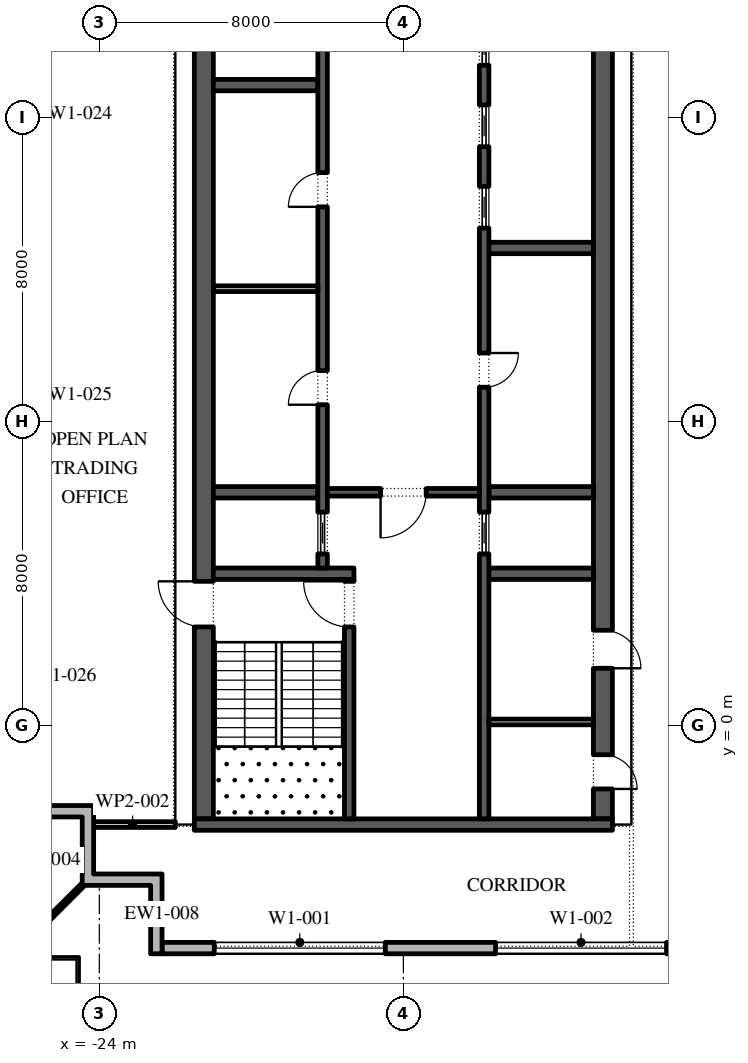
"""IFC4 building model, lengths in metres.
Left out: names, types, materials, properties, quantities, classifications, styles, units other than length and angle.
Written with IfcOpenShell. Run it as: python <this file> out.ifc"""

import sys

from ifc_helpers import new_model, si_unit, direction, frame, frame_2d, origin, place, context, subcontext, project, spatial, polyline, rectangle, outline, extrude, element, fill, save


model = new_model("IFC4")
c1 = context("Model", 3, precision=1e-05, world=origin(), true_north=direction((0.0, 1.0)))
c2 = subcontext(c1, "Body", "Model", "MODEL_VIEW")
j1 = project(units=[si_unit("LENGTHUNIT", "METRE"), si_unit("PLANEANGLEUNIT", "RADIAN")], contexts=[c1])
p1 = place(None, origin())
s1 = spatial("IfcSite", under=j1, at=p1, CompositionType="ELEMENT")
p2 = place(p1, origin())
s2 = spatial("IfcBuilding", under=s1, at=p2, CompositionType="ELEMENT")
p3 = place(p2, frame((0.0, 0.0, 309.0)))
s3 = spatial("IfcBuildingStorey", under=s2, at=p3, CompositionType="ELEMENT", Elevation=309.0)
p4 = place(p3, frame((-22.35, -5.85, 0.0), z_axis=(0.0, 0.0, 1.0), x_axis=(1.0, 0.0, 0.0)))
e1 = element("IfcWall", 1, at=p4, inside=s3, PredefinedType="STANDARD", context=c2, shape_type="SweptSolid", body=[
    extrude(rectangle(XDim=45.0, YDim=0.3, at=frame_2d((22.5, 0.0))), origin(), (0.0, 0.0, 1.0), 4.0),
])
p5 = place(p4, frame((1.375, 0.0, 0.45)))
e2 = element("IfcOpeningElement", 2, at=p5, cuts=e1, PredefinedType="OPENING", context=c2, shape_type="SweptSolid", body=[
    extrude(rectangle(XDim=4.5, YDim=3.05, at=frame_2d((2.25, 1.525))), frame((0.0, 0.16, 0.0), z_axis=(0.0, -1.0, 0.0), x_axis=(1.0, 0.0, 0.0)), (0.0, 0.0, 1.0), 0.32),
])
p6 = place(p4, frame((8.775, 0.0, 0.45)))
e3 = element("IfcOpeningElement", 3, at=p6, cuts=e1, PredefinedType="OPENING", context=c2, shape_type="SweptSolid", body=[
    extrude(rectangle(XDim=4.5, YDim=3.05, at=frame_2d((2.25, 1.525))), frame((0.0, 0.16, 0.0), z_axis=(0.0, -1.0, 0.0), x_axis=(1.0, 0.0, 0.0)), (0.0, 0.0, 1.0), 0.32),
])
p7 = place(p4, frame((17.375, 0.0, 0.0)))
e4 = element("IfcOpeningElement", 4, at=p7, cuts=e1, PredefinedType="OPENING", context=c2, shape_type="SweptSolid", body=[
    extrude(rectangle(XDim=2.4, YDim=3.5, at=frame_2d((1.2, 1.75))), frame((0.0, 0.16, 0.0), z_axis=(0.0, -1.0, 0.0), x_axis=(1.0, 0.0, 0.0)), (0.0, 0.0, 1.0), 0.32),
])
p8 = place(p4, frame((23.875, 0.0, 0.45)))
e5 = element("IfcOpeningElement", 5, at=p8, cuts=e1, PredefinedType="OPENING", context=c2, shape_type="SweptSolid", body=[
    extrude(rectangle(XDim=4.5, YDim=3.05, at=frame_2d((2.25, 1.525))), frame((0.0, 0.16, 0.0), z_axis=(0.0, -1.0, 0.0), x_axis=(1.0, 0.0, 0.0)), (0.0, 0.0, 1.0), 0.32),
])
p9 = place(p4, frame((31.425, 0.0, 0.45)))
e6 = element("IfcOpeningElement", 6, at=p9, cuts=e1, PredefinedType="OPENING", context=c2, shape_type="SweptSolid", body=[
    extrude(rectangle(XDim=4.5, YDim=3.05, at=frame_2d((2.25, 1.525))), frame((0.0, 0.16, 0.0), z_axis=(0.0, -1.0, 0.0), x_axis=(1.0, 0.0, 0.0)), (0.0, 0.0, 1.0), 0.32),
])
p10 = place(p4, frame((38.975, 0.0, 0.45)))
e7 = element("IfcOpeningElement", 7, at=p10, cuts=e1, PredefinedType="OPENING", context=c2, shape_type="SweptSolid", body=[
    extrude(rectangle(XDim=4.5, YDim=3.05, at=frame_2d((2.25, 1.525))), frame((0.0, 0.16, 0.0), z_axis=(0.0, -1.0, 0.0), x_axis=(1.0, 0.0, 0.0)), (0.0, 0.0, 1.0), 0.32),
])
p11 = place(p3, origin())
e8 = element("IfcWall", 8, at=p11, inside=s3, PredefinedType="STANDARD", context=c2, shape_type="SweptSolid", body=[
    extrude(outline(polyline([(-22.65, -4.2), (-24.45, -4.2), (-24.45, -2.4), (-25.95, -2.4), (-25.95, -2.1), (-24.15, -2.1), (-24.15, -3.9), (-22.35, -3.9), (-22.35, -6.0), (-22.65, -6.0), (-22.65, -4.2)])), origin(), (0.0, 0.0, 1.0), 4.0),
])
p12 = place(p3, frame((-24.45, -4.2, -0.05), z_axis=(0.0, 0.0, 1.0), x_axis=(-0.707106781187, -0.707106781187, 0.0)))
e9 = element("IfcWall", 9, at=p12, inside=s3, PredefinedType="STANDARD", context=c2, shape_type="SweptSolid", body=[
    extrude(rectangle(XDim=2.667, YDim=0.1, at=frame_2d((1.333, 0.0))), origin(), (0.0, 0.0, 1.0), 4.05),
])
p13 = place(p3, frame((-21.25, -2.45, 0.0), z_axis=(0.0, 0.0, 1.0), x_axis=(0.0, 1.0, 0.0)))
e10 = element("IfcWall", 10, at=p13, inside=s3, PredefinedType="SHEAR", context=c2, shape_type="SweptSolid", body=[
    extrude(rectangle(XDim=27.9, YDim=0.5, at=frame_2d((13.95, 0.0))), origin(), (0.0, 0.0, 1.0), 4.0),
])
p14 = place(p13, frame((5.05, 0.0, 0.0)))
e11 = element("IfcOpeningElement", 11, at=p14, cuts=e10, PredefinedType="OPENING", context=c2, shape_type="SweptSolid", body=[
    extrude(rectangle(XDim=1.2, YDim=2.1, at=frame_2d((0.6, 1.05))), frame((0.0, 0.26, 0.0), z_axis=(0.0, -1.0, 0.0), x_axis=(1.0, 0.0, 0.0)), (0.0, 0.0, 1.0), 0.52),
])
p15 = place(p13, frame((21.65, 0.0, 0.0)))
e12 = element("IfcOpeningElement", 12, at=p15, cuts=e10, PredefinedType="OPENING", context=c2, shape_type="SweptSolid", body=[
    extrude(rectangle(XDim=1.2, YDim=2.1, at=frame_2d((0.6, 1.05))), frame((0.0, 0.26, 0.0), z_axis=(0.0, -1.0, 0.0), x_axis=(1.0, 0.0, 0.0)), (0.0, 0.0, 1.0), 0.52),
])
p16 = place(p3, frame((-10.75, -2.45, 0.0), z_axis=(0.0, 0.0, 1.0), x_axis=(0.0, 1.0, 0.0)))
e13 = element("IfcWall", 13, at=p16, inside=s3, PredefinedType="SHEAR", context=c2, shape_type="SweptSolid", body=[
    extrude(rectangle(XDim=27.9, YDim=0.5, at=frame_2d((13.95, 0.0))), origin(), (0.0, 0.0, 1.0), 4.0),
])
p17 = place(p16, frame((23.65, 0.0, 0.0)))
e14 = element("IfcOpeningElement", 14, at=p17, cuts=e13, PredefinedType="OPENING", context=c2, shape_type="SweptSolid", body=[
    extrude(rectangle(XDim=2.4, YDim=2.1, at=frame_2d((1.2, 1.05))), frame((0.0, 0.26, 0.0), z_axis=(0.0, -1.0, 0.0), x_axis=(1.0, 0.0, 0.0)), (0.0, 0.0, 1.0), 0.52),
])
p18 = place(p16, frame((0.788, 0.0, 0.0)))
e15 = element("IfcOpeningElement", 15, at=p18, cuts=e13, PredefinedType="OPENING", context=c2, shape_type="SweptSolid", body=[
    extrude(rectangle(XDim=0.9, YDim=2.1, at=frame_2d((0.45, 1.05))), frame((0.0, 0.26, 0.0), z_axis=(0.0, -1.0, 0.0), x_axis=(1.0, 0.0, 0.0)), (0.0, 0.0, 1.0), 0.52),
])
p19 = place(p16, frame((3.962, 0.0, 0.0)))
e16 = element("IfcOpeningElement", 16, at=p19, cuts=e13, PredefinedType="OPENING", context=c2, shape_type="SweptSolid", body=[
    extrude(rectangle(XDim=1.0, YDim=2.1, at=frame_2d((0.5, 1.05))), frame((0.0, 0.26, 0.0), z_axis=(0.0, -1.0, 0.0), x_axis=(1.0, 0.0, 0.0)), (0.0, 0.0, 1.0), 0.52),
])
p20 = place(p3, frame((-21.5, -2.6, 0.0), z_axis=(0.0, 0.0, 1.0), x_axis=(1.0, 0.0, 0.0)))
e17 = element("IfcWall", 17, at=p20, inside=s3, PredefinedType="SHEAR", context=c2, shape_type="SweptSolid", body=[
    extrude(rectangle(XDim=11.0, YDim=0.3, at=frame_2d((5.5, 0.0))), origin(), (0.0, 0.0, 1.0), 4.0),
])
p21 = place(p3, frame((-21.0, 4.0, 0.0), z_axis=(0.0, 0.0, 1.0), x_axis=(1.0, 0.0, 0.0)))
e18 = element("IfcWall", 18, at=p21, inside=s3, PredefinedType="SHEAR", context=c2, shape_type="SweptSolid", body=[
    extrude(rectangle(XDim=3.7, YDim=0.3, at=frame_2d((1.85, 0.0))), origin(), (0.0, 0.0, 1.0), 4.0),
])
p22 = place(p3, frame((-17.425, -2.45, 0.0), z_axis=(0.0, 0.0, 1.0), x_axis=(0.0, 1.0, 0.0)))
e19 = element("IfcWall", 19, at=p22, inside=s3, PredefinedType="SHEAR", context=c2, shape_type="SweptSolid", body=[
    extrude(rectangle(XDim=6.3, YDim=0.25, at=frame_2d((3.15, 0.0))), origin(), (0.0, 0.0, 1.0), 4.0),
])
p23 = place(p22, frame((5.05, 0.0, 0.0)))
e20 = element("IfcOpeningElement", 20, at=p23, cuts=e19, PredefinedType="OPENING", context=c2, shape_type="SweptSolid", body=[
    extrude(rectangle(XDim=1.2, YDim=2.1, at=frame_2d((0.6, 1.05))), frame((0.0, 0.135, 0.0), z_axis=(0.0, -1.0, 0.0), x_axis=(1.0, 0.0, 0.0)), (0.0, 0.0, 1.0), 0.27),
])
for number, where, z_axis, x_axis in (
    (21, (-21.0, 6.143, 0.0), (0.0, 0.0, 1.0), (1.0, 0.0, 0.0)),
    (22, (-21.0, 16.857, 0.0), (0.0, 0.0, 1.0), (1.0, 0.0, 0.0)),
):
    element("IfcWall", number, at=place(p3, frame(where, z_axis=z_axis, x_axis=x_axis)), inside=s3, PredefinedType="SHEAR", context=c2, shape_type="SweptSolid", body=[
        extrude(rectangle(XDim=2.75, YDim=0.3, at=frame_2d((1.375, 0.0))), origin(), (0.0, 0.0, 1.0), 4.0),
    ])
p24 = place(p3, frame((-18.125, 4.15, 0.0), z_axis=(0.0, 0.0, 1.0), x_axis=(0.0, 1.0, 0.0)))
e23 = element("IfcWall", 23, at=p24, inside=s3, PredefinedType="SHEAR", context=c2, shape_type="SweptSolid", body=[
    extrude(rectangle(XDim=14.7, YDim=0.25, at=frame_2d((7.35, 0.0))), origin(), (0.0, 0.0, 1.0), 4.0),
])
p25 = place(p24, frame((4.296, 0.0, 0.0)))
e24 = element("IfcOpeningElement", 24, at=p25, cuts=e23, PredefinedType="OPENING", context=c2, shape_type="SweptSolid", body=[
    extrude(rectangle(XDim=0.9, YDim=2.1, at=frame_2d((0.45, 1.05))), frame((0.0, 0.135, 0.0), z_axis=(0.0, -1.0, 0.0), x_axis=(1.0, 0.0, 0.0)), (0.0, 0.0, 1.0), 0.27),
])
p26 = place(p24, frame((9.504, 0.0, 0.0)))
e25 = element("IfcOpeningElement", 25, at=p26, cuts=e23, PredefinedType="OPENING", context=c2, shape_type="SweptSolid", body=[
    extrude(rectangle(XDim=0.9, YDim=2.1, at=frame_2d((0.45, 1.05))), frame((0.0, 0.135, 0.0), z_axis=(0.0, -1.0, 0.0), x_axis=(1.0, 0.0, 0.0)), (0.0, 0.0, 1.0), 0.27),
])
p27 = place(p24, frame((0.371, 0.0, 0.0)))
e26 = element("IfcOpeningElement", 26, at=p27, cuts=e23, PredefinedType="OPENING", context=c2, shape_type="SweptSolid", body=[
    extrude(rectangle(XDim=1.1, YDim=2.1, at=frame_2d((0.55, 1.05))), frame((0.0, 0.135, 0.0), z_axis=(0.0, -1.0, 0.0), x_axis=(1.0, 0.0, 0.0)), (0.0, 0.0, 1.0), 0.27),
])
p28 = place(p3, frame((-21.0, 11.5, 0.0), z_axis=(0.0, 0.0, 1.0), x_axis=(1.0, 0.0, 0.0)))
e27 = element("IfcWall", 27, at=p28, inside=s3, PredefinedType="PARTITIONING", context=c2, shape_type="SweptSolid", body=[
    extrude(rectangle(XDim=2.75, YDim=0.15, at=frame_2d((1.375, 0.0))), origin(), (0.0, 0.0, 1.0), 4.0),
])
p29 = place(p3, frame((-14.0, 4.0, 0.0), z_axis=(0.0, 0.0, 1.0), x_axis=(1.0, 0.0, 0.0)))
e28 = element("IfcWall", 28, at=p29, inside=s3, PredefinedType="SHEAR", context=c2, shape_type="SweptSolid", body=[
    extrude(rectangle(XDim=3.0, YDim=0.3, at=frame_2d((1.5, 0.0))), origin(), (0.0, 0.0, 1.0), 4.0),
])
for number, where, z_axis, x_axis in (
    (29, (-13.75, 6.143, 0.0), (0.0, 0.0, 1.0), (1.0, 0.0, 0.0)),
    (30, (-13.75, 12.571, 0.0), (0.0, 0.0, 1.0), (1.0, 0.0, 0.0)),
):
    element("IfcWall", number, at=place(p3, frame(where, z_axis=z_axis, x_axis=x_axis)), inside=s3, PredefinedType="SHEAR", context=c2, shape_type="SweptSolid", body=[
        extrude(rectangle(XDim=2.75, YDim=0.3, at=frame_2d((1.375, 0.0))), origin(), (0.0, 0.0, 1.0), 4.0),
    ])
p30 = place(p3, frame((-13.875, -2.45, 0.0), z_axis=(0.0, 0.0, 1.0), x_axis=(0.0, 1.0, 0.0)))
e31 = element("IfcWall", 31, at=p30, inside=s3, PredefinedType="SHEAR", context=c2, shape_type="SweptSolid", body=[
    extrude(rectangle(XDim=21.3, YDim=0.25, at=frame_2d((10.65, 0.0))), origin(), (0.0, 0.0, 1.0), 4.0),
])
p31 = place(p30, frame((11.357, 0.0, 0.0)))
e32 = element("IfcOpeningElement", 32, at=p31, cuts=e31, PredefinedType="OPENING", context=c2, shape_type="SweptSolid", body=[
    extrude(rectangle(XDim=0.9, YDim=2.1, at=frame_2d((0.45, 1.05))), frame((0.0, 0.135, 0.0), z_axis=(0.0, -1.0, 0.0), x_axis=(1.0, 0.0, 0.0)), (0.0, 0.0, 1.0), 0.27),
])
p32 = place(p30, frame((6.971, 0.0, 0.0)))
e33 = element("IfcOpeningElement", 33, at=p32, cuts=e31, PredefinedType="OPENING", context=c2, shape_type="SweptSolid", body=[
    extrude(rectangle(XDim=1.1, YDim=2.1, at=frame_2d((0.55, 1.05))), frame((0.0, 0.135, 0.0), z_axis=(0.0, -1.0, 0.0), x_axis=(1.0, 0.0, 0.0)), (0.0, 0.0, 1.0), 0.27),
])
p33 = place(p30, frame((15.543, 0.0, 0.0)))
e34 = element("IfcOpeningElement", 34, at=p33, cuts=e31, PredefinedType="OPENING", context=c2, shape_type="SweptSolid", body=[
    extrude(rectangle(XDim=1.1, YDim=2.1, at=frame_2d((0.55, 1.05))), frame((0.0, 0.135, 0.0), z_axis=(0.0, -1.0, 0.0), x_axis=(1.0, 0.0, 0.0)), (0.0, 0.0, 1.0), 0.27),
])
p34 = place(p30, frame((17.686, 0.0, 0.0)))
e35 = element("IfcOpeningElement", 35, at=p34, cuts=e31, PredefinedType="OPENING", context=c2, shape_type="SweptSolid", body=[
    extrude(rectangle(XDim=1.1, YDim=2.1, at=frame_2d((0.55, 1.05))), frame((0.0, 0.135, 0.0), z_axis=(0.0, -1.0, 0.0), x_axis=(1.0, 0.0, 0.0)), (0.0, 0.0, 1.0), 0.27),
])
p35 = place(p30, frame((19.829, 0.0, 0.0)))
e36 = element("IfcOpeningElement", 36, at=p35, cuts=e31, PredefinedType="OPENING", context=c2, shape_type="SweptSolid", body=[
    extrude(rectangle(XDim=1.1, YDim=2.1, at=frame_2d((0.55, 1.05))), frame((0.0, 0.135, 0.0), z_axis=(0.0, -1.0, 0.0), x_axis=(1.0, 0.0, 0.0)), (0.0, 0.0, 1.0), 0.27),
])
p36 = place(p3, frame((-18.0, 6.143, 0.0), z_axis=(0.0, 0.0, 1.0), x_axis=(1.0, 0.0, 0.0)))
e37 = element("IfcWall", 37, at=p36, inside=s3, PredefinedType="SHEAR", context=c2, shape_type="SweptSolid", body=[
    extrude(rectangle(XDim=4.0, YDim=0.2, at=frame_2d((2.0, 0.0))), origin(), (0.0, 0.0, 1.0), 4.0),
])
p37 = place(p36, frame((1.4, 0.0, 0.0)))
e38 = element("IfcOpeningElement", 38, at=p37, cuts=e37, PredefinedType="OPENING", context=c2, shape_type="SweptSolid", body=[
    extrude(rectangle(XDim=1.2, YDim=2.1, at=frame_2d((0.6, 1.05))), frame((0.0, 0.11, 0.0), z_axis=(0.0, -1.0, 0.0), x_axis=(1.0, 0.0, 0.0)), (0.0, 0.0, 1.0), 0.22),
])
p38 = place(p3, frame((-13.75, 0.1, 0.0), z_axis=(0.0, 0.0, 1.0), x_axis=(1.0, 0.0, 0.0)))
e39 = element("IfcWall", 39, at=p38, inside=s3, PredefinedType="PARTITIONING", context=c2, shape_type="SweptSolid", body=[
    extrude(rectangle(XDim=2.75, YDim=0.15, at=frame_2d((1.375, 0.0))), origin(), (0.0, 0.0, 1.0), 4.0),
])
p39 = place(p3, frame((-24.25, -2.6, 0.0), z_axis=(0.0, 0.0, 1.0), x_axis=(1.0, 0.0, 0.0)))
e40 = element("IfcWall", 40, at=p39, inside=s3, PredefinedType="PARTITIONING", context=c2, shape_type="SweptSolid", body=[
    extrude(rectangle(XDim=2.25, YDim=0.15, at=frame_2d((1.125, 0.0))), origin(), (0.0, 0.0, 1.0), 4.0),
])
p40 = place(p5, origin())
e41 = element("IfcWindow", 41, at=p40, inside=s3, PartitioningType="DOUBLE_PANEL_VERTICAL", PredefinedType="WINDOW", context=c2, shape_type="SweptSolid", body=[
    extrude(rectangle(XDim=4.5, YDim=3.05, at=frame_2d((2.25, 1.525))), frame((0.0, 0.03, 0.0), z_axis=(0.0, -1.0, 0.0), x_axis=(1.0, 0.0, 0.0)), (0.0, 0.0, 1.0), 0.06),
])
fill(e2, e41)
p41 = place(p6, origin())
e42 = element("IfcWindow", 42, at=p41, inside=s3, PartitioningType="DOUBLE_PANEL_VERTICAL", PredefinedType="WINDOW", context=c2, shape_type="SweptSolid", body=[
    extrude(rectangle(XDim=4.5, YDim=3.05, at=frame_2d((2.25, 1.525))), frame((0.0, 0.03, 0.0), z_axis=(0.0, -1.0, 0.0), x_axis=(1.0, 0.0, 0.0)), (0.0, 0.0, 1.0), 0.06),
])
fill(e3, e42)
p42 = place(p25, origin())
e43 = element("IfcDoor", 43, at=p42, inside=s3, OperationType="SINGLE_SWING_RIGHT", PredefinedType="DOOR", context=c2, shape_type="SweptSolid", body=[
    extrude(rectangle(XDim=0.9, YDim=2.1, at=frame_2d((0.45, 1.05))), frame((0.0, 0.125, 0.0), z_axis=(0.0, -1.0, 0.0), x_axis=(1.0, 0.0, 0.0)), (0.0, 0.0, 1.0), 0.05),
])
fill(e24, e43)
p43 = place(p26, origin())
e44 = element("IfcDoor", 44, at=p43, inside=s3, OperationType="SINGLE_SWING_RIGHT", PredefinedType="DOOR", context=c2, shape_type="SweptSolid", body=[
    extrude(rectangle(XDim=0.9, YDim=2.1, at=frame_2d((0.45, 1.05))), frame((0.0, 0.125, 0.0), z_axis=(0.0, -1.0, 0.0), x_axis=(1.0, 0.0, 0.0)), (0.0, 0.0, 1.0), 0.05),
])
fill(e25, e44)
p44 = place(p27, origin())
e45 = element("IfcDoor", 45, at=p44, inside=s3, OperationType="SLIDING_TO_LEFT", PredefinedType="DOOR", context=c2, shape_type="SweptSolid", body=[
    extrude(rectangle(XDim=1.1, YDim=2.1, at=frame_2d((0.55, 1.05))), frame((0.0, 0.025, 0.0), z_axis=(0.0, -1.0, 0.0), x_axis=(1.0, 0.0, 0.0)), (0.0, 0.0, 1.0), 0.05),
])
fill(e26, e45)
p45 = place(p31, frame((0.9, -0.2, 0.0), z_axis=(0.0, 0.0, 1.0), x_axis=(-1.0, 0.0, 0.0)))
e46 = element("IfcDoor", 46, at=p45, inside=s3, OperationType="SINGLE_SWING_RIGHT", PredefinedType="DOOR", context=c2, shape_type="SweptSolid", body=[
    extrude(rectangle(XDim=0.9, YDim=2.1, at=frame_2d((0.45, 1.05))), frame((0.0, -0.075, 0.0), z_axis=(0.0, -1.0, 0.0), x_axis=(1.0, 0.0, 0.0)), (0.0, 0.0, 1.0), 0.05),
])
fill(e32, e46)
p46 = place(p32, origin())
e47 = element("IfcDoor", 47, at=p46, inside=s3, OperationType="SLIDING_TO_LEFT", PredefinedType="DOOR", context=c2, shape_type="SweptSolid", body=[
    extrude(rectangle(XDim=1.1, YDim=2.1, at=frame_2d((0.55, 1.05))), frame((0.0, 0.025, 0.0), z_axis=(0.0, -1.0, 0.0), x_axis=(1.0, 0.0, 0.0)), (0.0, 0.0, 1.0), 0.05),
])
fill(e33, e47)
p47 = place(p33, origin())
e48 = element("IfcDoor", 48, at=p47, inside=s3, OperationType="SLIDING_TO_LEFT", PredefinedType="DOOR", context=c2, shape_type="SweptSolid", body=[
    extrude(rectangle(XDim=1.1, YDim=2.1, at=frame_2d((0.55, 1.05))), frame((0.0, 0.025, 0.0), z_axis=(0.0, -1.0, 0.0), x_axis=(1.0, 0.0, 0.0)), (0.0, 0.0, 1.0), 0.05),
])
fill(e34, e48)
p48 = place(p34, origin())
e49 = element("IfcDoor", 49, at=p48, inside=s3, OperationType="SLIDING_TO_LEFT", PredefinedType="DOOR", context=c2, shape_type="SweptSolid", body=[
    extrude(rectangle(XDim=1.1, YDim=2.1, at=frame_2d((0.55, 1.05))), frame((0.0, 0.025, 0.0), z_axis=(0.0, -1.0, 0.0), x_axis=(1.0, 0.0, 0.0)), (0.0, 0.0, 1.0), 0.05),
])
fill(e35, e49)
p49 = place(p35, origin())
e50 = element("IfcDoor", 50, at=p49, inside=s3, OperationType="SLIDING_TO_LEFT", PredefinedType="DOOR", context=c2, shape_type="SweptSolid", body=[
    extrude(rectangle(XDim=1.1, YDim=2.1, at=frame_2d((0.55, 1.05))), frame((0.0, 0.025, 0.0), z_axis=(0.0, -1.0, 0.0), x_axis=(1.0, 0.0, 0.0)), (0.0, 0.0, 1.0), 0.05),
])
fill(e36, e50)
p50 = place(p37, frame((1.2, 0.0, 0.0), z_axis=(0.0, 0.0, 1.0), x_axis=(-1.0, 0.0, 0.0)))
e51 = element("IfcDoor", 51, at=p50, inside=s3, OperationType="SINGLE_SWING_LEFT", PredefinedType="DOOR", context=c2, shape_type="SweptSolid", body=[
    extrude(rectangle(XDim=1.2, YDim=2.1, at=frame_2d((0.6, 1.05))), frame((0.0, 0.025, 0.0), z_axis=(0.0, -1.0, 0.0), x_axis=(1.0, 0.0, 0.0)), (0.0, 0.0, 1.0), 0.05),
])
fill(e38, e51)
p51 = place(p23, origin())
e52 = element("IfcDoor", 52, at=p51, inside=s3, OperationType="SINGLE_SWING_LEFT", PredefinedType="DOOR", context=c2, shape_type="SweptSolid", body=[
    extrude(rectangle(XDim=1.2, YDim=2.1, at=frame_2d((0.6, 1.05))), frame((0.0, 0.025, 0.0), z_axis=(0.0, -1.0, 0.0), x_axis=(1.0, 0.0, 0.0)), (0.0, 0.0, 1.0), 0.05),
])
fill(e20, e52)
p52 = place(p14, origin())
e53 = element("IfcDoor", 53, at=p52, inside=s3, OperationType="SINGLE_SWING_LEFT", PredefinedType="DOOR", context=c2, shape_type="SweptSolid", body=[
    extrude(rectangle(XDim=1.2, YDim=2.1, at=frame_2d((0.6, 1.05))), frame((0.0, 0.025, 0.0), z_axis=(0.0, -1.0, 0.0), x_axis=(1.0, 0.0, 0.0)), (0.0, 0.0, 1.0), 0.05),
])
fill(e11, e53)
p53 = place(p18, frame((0.9, 0.45, 0.0), z_axis=(0.0, 0.0, 1.0), x_axis=(-1.0, 0.0, 0.0)))
e54 = element("IfcDoor", 54, at=p53, inside=s3, OperationType="SINGLE_SWING_LEFT", PredefinedType="DOOR", context=c2, shape_type="SweptSolid", body=[
    extrude(rectangle(XDim=0.9, YDim=2.1, at=frame_2d((0.45, 1.05))), frame((0.0, 0.25, 0.0), z_axis=(0.0, -1.0, 0.0), x_axis=(1.0, 0.0, 0.0)), (0.0, 0.0, 1.0), 0.05),
])
fill(e15, e54)
p54 = place(p19, frame((1.0, 0.45, 0.0), z_axis=(0.0, 0.0, 1.0), x_axis=(-1.0, 0.0, 0.0)))
e55 = element("IfcDoor", 55, at=p54, inside=s3, OperationType="SINGLE_SWING_LEFT", PredefinedType="DOOR", context=c2, shape_type="SweptSolid", body=[
    extrude(rectangle(XDim=1.0, YDim=2.1, at=frame_2d((0.5, 1.05))), frame((0.0, 0.25, 0.0), z_axis=(0.0, -1.0, 0.0), x_axis=(1.0, 0.0, 0.0)), (0.0, 0.0, 1.0), 0.05),
])
fill(e16, e55)
save(model, sys.argv[1])
